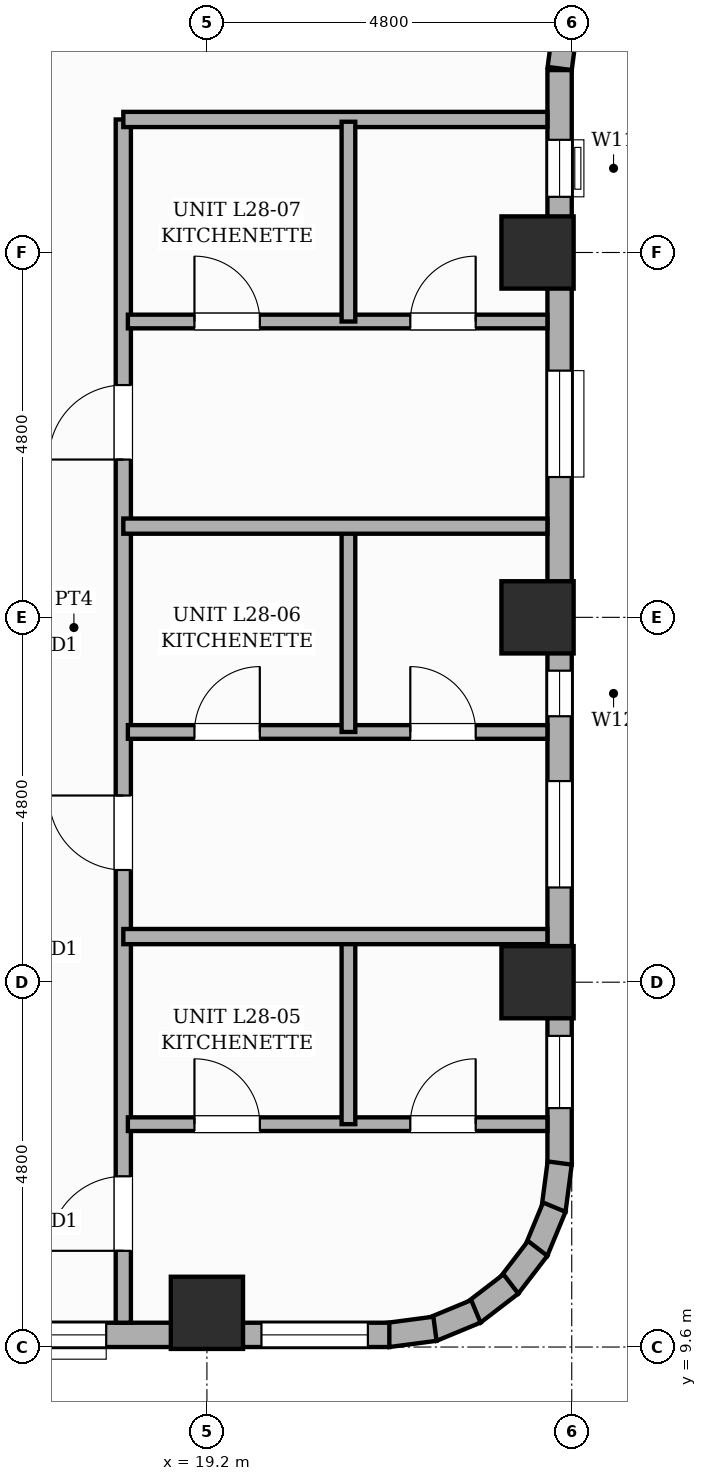
"""IFC4 building model, lengths in metres.
Left out: names, types, materials, properties, quantities, classifications, styles, units other than length and angle.
Written with IfcOpenShell. Run it as: python <this file> out.ifc"""

import sys

from ifc_helpers import new_model, si_unit, direction, frame, frame_2d, origin, origin_2d, place, context, subcontext, project, spatial, rectangle, extrude, element, fill, save


model = new_model("IFC4")
c1 = context("Model", 3, precision=1e-05, world=origin(), true_north=direction((0.0, 1.0)))
c2 = subcontext(c1, "Body", "Model", "MODEL_VIEW")
j1 = project(units=[si_unit("LENGTHUNIT", "METRE"), si_unit("PLANEANGLEUNIT", "RADIAN")], contexts=[c1])
p1 = place(None, origin())
s1 = spatial("IfcSite", under=j1, at=p1, CompositionType="ELEMENT")
p2 = place(p1, origin())
s2 = spatial("IfcBuilding", under=s1, at=p2, CompositionType="ELEMENT")
p3 = place(p2, frame((0.0, 0.0, 110.8)))
s3 = spatial("IfcBuildingStorey", under=s2, at=p3, CompositionType="ELEMENT", Elevation=110.8)
for number, where, z_axis, x_axis in (
    (1, (19.2, 10.05, 0.0), (0.0, 0.0, 1.0), (1.0, 0.0, 0.0)),
    (2, (23.55, 14.4, 0.0), (0.0, 0.0, 1.0), (1.0, 0.0, 0.0)),
    (3, (23.55, 19.2, 0.0), (0.0, 0.0, 1.0), (1.0, 0.0, 0.0)),
    (4, (23.55, 24.0, 0.0), (0.0, 0.0, 1.0), (1.0, 0.0, 0.0)),
):
    element("IfcColumn", number, at=place(p3, frame(where, z_axis=z_axis, x_axis=x_axis)), inside=s3, PredefinedType="COLUMN", context=c2, shape_type="SweptSolid", body=[
        extrude(rectangle(XDim=0.95, YDim=0.95, at=origin_2d()), origin(), (0.0, 0.0, 1.0), 3.6),
    ])
p4 = place(p3, frame((23.923, 27.042, 0.0), z_axis=(0.0, 0.0, 1.0), x_axis=(-0.130555323746, -0.9914410257, 0.0)))
e5 = element("IfcWall", 5, at=p4, inside=s3, PredefinedType="STANDARD", context=c2, shape_type="SweptSolid", body=[
    extrude(rectangle(XDim=0.626, YDim=0.32, at=frame_2d((0.313, 0.0))), origin(), (0.0, 0.0, 1.0), 2.54),
])
p5 = place(p3, frame((23.84, 26.4, 0.0), z_axis=(0.0, 0.0, 1.0), x_axis=(0.0, -1.0, 0.0)))
e6 = element("IfcWall", 6, at=p5, inside=s3, PredefinedType="STANDARD", context=c2, shape_type="SweptSolid", body=[
    extrude(rectangle(XDim=14.4, YDim=0.32, at=frame_2d((7.2, 0.0))), origin(), (0.0, 0.0, 1.0), 2.54),
])
p6 = place(p5, frame((9.354, 0.0, 0.65)))
e7 = element("IfcOpeningElement", 7, at=p6, cuts=e6, PredefinedType="OPENING", context=c2, shape_type="SweptSolid", body=[
    extrude(rectangle(XDim=1.4, YDim=1.1, at=frame_2d((0.7, 0.55))), frame((0.0, 0.17, 0.0), z_axis=(0.0, -1.0, 0.0), x_axis=(1.0, 0.0, 0.0)), (0.0, 0.0, 1.0), 0.34),
])
p7 = place(p5, frame((3.954, 0.0, 0.65)))
e8 = element("IfcOpeningElement", 8, at=p7, cuts=e6, PredefinedType="OPENING", context=c2, shape_type="SweptSolid", body=[
    extrude(rectangle(XDim=1.4, YDim=1.1, at=frame_2d((0.7, 0.55))), frame((0.0, 0.17, 0.0), z_axis=(0.0, -1.0, 0.0), x_axis=(1.0, 0.0, 0.0)), (0.0, 0.0, 1.0), 0.34),
])
p8 = place(p5, frame((12.707, 0.0, 0.45)))
e9 = element("IfcOpeningElement", 9, at=p8, cuts=e6, PredefinedType="OPENING", context=c2, shape_type="SweptSolid", body=[
    extrude(rectangle(XDim=0.95, YDim=1.8, at=frame_2d((0.475, 0.9))), frame((0.0, 0.17, 0.0), z_axis=(0.0, -1.0, 0.0), x_axis=(1.0, 0.0, 0.0)), (0.0, 0.0, 1.0), 0.34),
])
p9 = place(p5, frame((7.902, 0.0, 0.45)))
e10 = element("IfcOpeningElement", 10, at=p9, cuts=e6, PredefinedType="OPENING", context=c2, shape_type="SweptSolid", body=[
    extrude(rectangle(XDim=0.6, YDim=1.8, at=frame_2d((0.3, 0.9))), frame((0.0, 0.17, 0.0), z_axis=(0.0, -1.0, 0.0), x_axis=(1.0, 0.0, 0.0)), (0.0, 0.0, 1.0), 0.34),
])
p10 = place(p5, frame((0.917, 0.0, 0.45)))
e11 = element("IfcOpeningElement", 11, at=p10, cuts=e6, PredefinedType="OPENING", context=c2, shape_type="SweptSolid", body=[
    extrude(rectangle(XDim=0.75, YDim=1.8, at=frame_2d((0.375, 0.9))), frame((0.0, 0.17, 0.0), z_axis=(0.0, -1.0, 0.0), x_axis=(1.0, 0.0, 0.0)), (0.0, 0.0, 1.0), 0.34),
])
p11 = place(p3, frame((23.841, 12.021, 0.0), z_axis=(0.0, 0.0, 1.0), x_axis=(-0.130504898859, -0.991447664465, 0.0)))
e12 = element("IfcWall", 12, at=p11, inside=s3, PredefinedType="STANDARD", context=c2, shape_type="SweptSolid", body=[
    extrude(rectangle(XDim=0.627, YDim=0.32, at=frame_2d((0.313, 0.0))), origin(), (0.0, 0.0, 1.0), 3.36),
])
for number, where, z_axis, x_axis in (
    (13, (23.771, 11.44, 0.0), (0.0, 0.0, 1.0), (-0.383, -0.924, 0.0)),
    (14, (23.552, 10.897, 0.0), (0.0, 0.0, 1.0), (-0.609, -0.793, 0.0)),
    (15, (23.2, 10.43, 0.0), (0.0, 0.0, 1.0), (-0.793, -0.609, 0.0)),
    (16, (22.739, 10.069, 0.0), (0.0, 0.0, 1.0), (-0.924, -0.383, 0.0)),
    (17, (22.2, 9.84, 0.0), (0.0, 0.0, 1.0), (-0.991, -0.131, 0.0)),
):
    element("IfcWall", number, at=place(p3, frame(where, z_axis=z_axis, x_axis=x_axis)), inside=s3, PredefinedType="STANDARD", context=c2, shape_type="SweptSolid", body=[
        extrude(rectangle(XDim=0.626, YDim=0.32, at=frame_2d((0.313, 0.0))), origin(), (0.0, 0.0, 1.0), 3.36),
    ])
p12 = place(p3, frame((21.6, 9.76, 0.0), z_axis=(0.0, 0.0, 1.0), x_axis=(-1.0, 0.0, 0.0)))
e18 = element("IfcWall", 18, at=p12, inside=s3, PredefinedType="STANDARD", context=c2, shape_type="SweptSolid", body=[
    extrude(rectangle(XDim=14.4, YDim=0.32, at=frame_2d((7.2, 0.0))), origin(), (0.0, 0.0, 1.0), 2.54),
])
p13 = place(p12, frame((5.653, 0.0, 0.45)))
e19 = element("IfcOpeningElement", 19, at=p13, cuts=e18, PredefinedType="OPENING", context=c2, shape_type="SweptSolid", body=[
    extrude(rectangle(XDim=0.75, YDim=1.8, at=frame_2d((0.375, 0.9))), frame((0.0, 0.17, 0.0), z_axis=(0.0, -1.0, 0.0), x_axis=(1.0, 0.0, 0.0)), (0.0, 0.0, 1.0), 0.34),
])
p14 = place(p12, frame((0.282, 0.0, 0.65)))
e20 = element("IfcOpeningElement", 20, at=p14, cuts=e18, PredefinedType="OPENING", context=c2, shape_type="SweptSolid", body=[
    extrude(rectangle(XDim=1.4, YDim=1.1, at=frame_2d((0.7, 0.55))), frame((0.0, 0.17, 0.0), z_axis=(0.0, -1.0, 0.0), x_axis=(1.0, 0.0, 0.0)), (0.0, 0.0, 1.0), 0.34),
])
p15 = place(p12, frame((3.725, 0.0, 0.65)))
e21 = element("IfcOpeningElement", 21, at=p15, cuts=e18, PredefinedType="OPENING", context=c2, shape_type="SweptSolid", body=[
    extrude(rectangle(XDim=1.4, YDim=1.1, at=frame_2d((0.7, 0.55))), frame((0.0, 0.17, 0.0), z_axis=(0.0, -1.0, 0.0), x_axis=(1.0, 0.0, 0.0)), (0.0, 0.0, 1.0), 0.34),
])
p16 = place(p3, frame((18.1, 9.92, 0.0), z_axis=(0.0, 0.0, 1.0), x_axis=(0.0, 1.0, 0.0)))
e22 = element("IfcWall", 22, at=p16, inside=s3, PredefinedType="PARTITIONING", context=c2, shape_type="SweptSolid", body=[
    extrude(rectangle(XDim=15.83, YDim=0.2, at=frame_2d((7.915, 0.0))), origin(), (0.0, 0.0, 1.0), 3.36),
])
p17 = place(p16, frame((0.946, 0.0, 0.0)))
e23 = element("IfcOpeningElement", 23, at=p17, cuts=e22, PredefinedType="OPENING", context=c2, shape_type="SweptSolid", body=[
    extrude(rectangle(XDim=0.98, YDim=2.18, at=frame_2d((0.49, 1.09))), frame((0.0, 0.11, 0.0), z_axis=(0.0, -1.0, 0.0), x_axis=(1.0, 0.0, 0.0)), (0.0, 0.0, 1.0), 0.22),
])
p18 = place(p16, frame((5.956, 0.0, 0.0)))
e24 = element("IfcOpeningElement", 24, at=p18, cuts=e22, PredefinedType="OPENING", context=c2, shape_type="SweptSolid", body=[
    extrude(rectangle(XDim=0.98, YDim=2.18, at=frame_2d((0.49, 1.09))), frame((0.0, 0.11, 0.0), z_axis=(0.0, -1.0, 0.0), x_axis=(1.0, 0.0, 0.0)), (0.0, 0.0, 1.0), 0.22),
])
p19 = place(p16, frame((11.356, 0.0, 0.0)))
e25 = element("IfcOpeningElement", 25, at=p19, cuts=e22, PredefinedType="OPENING", context=c2, shape_type="SweptSolid", body=[
    extrude(rectangle(XDim=0.98, YDim=2.18, at=frame_2d((0.49, 1.09))), frame((0.0, 0.11, 0.0), z_axis=(0.0, -1.0, 0.0), x_axis=(1.0, 0.0, 0.0)), (0.0, 0.0, 1.0), 0.22),
])
p20 = place(p3, frame((18.1, 25.75, 0.0), z_axis=(0.0, 0.0, 1.0), x_axis=(1.0, 0.0, 0.0)))
e26 = element("IfcWall", 26, at=p20, inside=s3, PredefinedType="PARTITIONING", context=c2, shape_type="SweptSolid", body=[
    extrude(rectangle(XDim=5.58, YDim=0.2, at=frame_2d((2.79, 0.0))), origin(), (0.0, 0.0, 1.0), 3.36),
])
p21 = place(p3, frame((18.16, 12.532, 0.0), z_axis=(0.0, 0.0, 1.0), x_axis=(1.0, 0.0, 0.0)))
e27 = element("IfcWall", 27, at=p21, inside=s3, PredefinedType="PLUMBINGWALL", context=c2, shape_type="SweptSolid", body=[
    extrude(rectangle(XDim=5.52, YDim=0.18, at=frame_2d((2.76, 0.0))), origin(), (0.0, 0.0, 1.0), 3.36),
])
p22 = place(p21, frame((0.876, 0.0, 0.0)))
e28 = element("IfcOpeningElement", 28, at=p22, cuts=e27, PredefinedType="OPENING", context=c2, shape_type="SweptSolid", body=[
    extrude(rectangle(XDim=0.86, YDim=2.1, at=frame_2d((0.43, 1.05))), frame((0.0, 0.1, 0.0), z_axis=(0.0, -1.0, 0.0), x_axis=(1.0, 0.0, 0.0)), (0.0, 0.0, 1.0), 0.2),
])
p23 = place(p21, frame((3.716, 0.0, 0.0)))
e29 = element("IfcOpeningElement", 29, at=p23, cuts=e27, PredefinedType="OPENING", context=c2, shape_type="SweptSolid", body=[
    extrude(rectangle(XDim=0.86, YDim=2.1, at=frame_2d((0.43, 1.05))), frame((0.0, 0.1, 0.0), z_axis=(0.0, -1.0, 0.0), x_axis=(1.0, 0.0, 0.0)), (0.0, 0.0, 1.0), 0.2),
])
p24 = place(p3, frame((21.062, 12.532, 0.0), z_axis=(0.0, 0.0, 1.0), x_axis=(0.0, 1.0, 0.0)))
e30 = element("IfcWall", 30, at=p24, inside=s3, PredefinedType="PLUMBINGWALL", context=c2, shape_type="SweptSolid", body=[
    extrude(rectangle(XDim=2.508, YDim=0.18, at=frame_2d((1.254, 0.0))), origin(), (0.0, 0.0, 1.0), 3.36),
])
p25 = place(p3, frame((18.1, 15.0, 0.0), z_axis=(0.0, 0.0, 1.0), x_axis=(1.0, 0.0, 0.0)))
e31 = element("IfcWall", 31, at=p25, inside=s3, PredefinedType="SOLIDWALL", context=c2, shape_type="SweptSolid", body=[
    extrude(rectangle(XDim=5.58, YDim=0.2, at=frame_2d((2.79, 0.0))), origin(), (0.0, 0.0, 1.0), 3.36),
])
p26 = place(p3, frame((18.16, 17.692, 0.0), z_axis=(0.0, 0.0, 1.0), x_axis=(1.0, 0.0, 0.0)))
e32 = element("IfcWall", 32, at=p26, inside=s3, PredefinedType="PLUMBINGWALL", context=c2, shape_type="SweptSolid", body=[
    extrude(rectangle(XDim=5.52, YDim=0.18, at=frame_2d((2.76, 0.0))), origin(), (0.0, 0.0, 1.0), 3.36),
])
p27 = place(p26, frame((0.876, 0.0, 0.0)))
e33 = element("IfcOpeningElement", 33, at=p27, cuts=e32, PredefinedType="OPENING", context=c2, shape_type="SweptSolid", body=[
    extrude(rectangle(XDim=0.86, YDim=2.1, at=frame_2d((0.43, 1.05))), frame((0.0, 0.1, 0.0), z_axis=(0.0, -1.0, 0.0), x_axis=(1.0, 0.0, 0.0)), (0.0, 0.0, 1.0), 0.2),
])
p28 = place(p26, frame((3.716, 0.0, 0.0)))
e34 = element("IfcOpeningElement", 34, at=p28, cuts=e32, PredefinedType="OPENING", context=c2, shape_type="SweptSolid", body=[
    extrude(rectangle(XDim=0.86, YDim=2.1, at=frame_2d((0.43, 1.05))), frame((0.0, 0.1, 0.0), z_axis=(0.0, -1.0, 0.0), x_axis=(1.0, 0.0, 0.0)), (0.0, 0.0, 1.0), 0.2),
])
p29 = place(p3, frame((21.062, 17.692, 0.0), z_axis=(0.0, 0.0, 1.0), x_axis=(0.0, 1.0, 0.0)))
e35 = element("IfcWall", 35, at=p29, inside=s3, PredefinedType="PLUMBINGWALL", context=c2, shape_type="SweptSolid", body=[
    extrude(rectangle(XDim=2.748, YDim=0.18, at=frame_2d((1.374, 0.0))), origin(), (0.0, 0.0, 1.0), 3.36),
])
p30 = place(p3, frame((18.1, 20.4, 0.0), z_axis=(0.0, 0.0, 1.0), x_axis=(1.0, 0.0, 0.0)))
e36 = element("IfcWall", 36, at=p30, inside=s3, PredefinedType="SOLIDWALL", context=c2, shape_type="SweptSolid", body=[
    extrude(rectangle(XDim=5.58, YDim=0.2, at=frame_2d((2.79, 0.0))), origin(), (0.0, 0.0, 1.0), 3.36),
])
p31 = place(p3, frame((18.16, 23.092, 0.0), z_axis=(0.0, 0.0, 1.0), x_axis=(1.0, 0.0, 0.0)))
e37 = element("IfcWall", 37, at=p31, inside=s3, PredefinedType="PLUMBINGWALL", context=c2, shape_type="SweptSolid", body=[
    extrude(rectangle(XDim=5.52, YDim=0.18, at=frame_2d((2.76, 0.0))), origin(), (0.0, 0.0, 1.0), 3.36),
])
p32 = place(p31, frame((0.876, 0.0, 0.0)))
e38 = element("IfcOpeningElement", 38, at=p32, cuts=e37, PredefinedType="OPENING", context=c2, shape_type="SweptSolid", body=[
    extrude(rectangle(XDim=0.86, YDim=2.1, at=frame_2d((0.43, 1.05))), frame((0.0, 0.1, 0.0), z_axis=(0.0, -1.0, 0.0), x_axis=(1.0, 0.0, 0.0)), (0.0, 0.0, 1.0), 0.2),
])
p33 = place(p31, frame((3.716, 0.0, 0.0)))
e39 = element("IfcOpeningElement", 39, at=p33, cuts=e37, PredefinedType="OPENING", context=c2, shape_type="SweptSolid", body=[
    extrude(rectangle(XDim=0.86, YDim=2.1, at=frame_2d((0.43, 1.05))), frame((0.0, 0.1, 0.0), z_axis=(0.0, -1.0, 0.0), x_axis=(1.0, 0.0, 0.0)), (0.0, 0.0, 1.0), 0.2),
])
p34 = place(p3, frame((21.062, 23.092, 0.0), z_axis=(0.0, 0.0, 1.0), x_axis=(0.0, 1.0, 0.0)))
e40 = element("IfcWall", 40, at=p34, inside=s3, PredefinedType="PLUMBINGWALL", context=c2, shape_type="SweptSolid", body=[
    extrude(rectangle(XDim=2.628, YDim=0.18, at=frame_2d((1.314, 0.0))), origin(), (0.0, 0.0, 1.0), 3.36),
])
p35 = place(p6, origin())
e41 = element("IfcWindow", 41, at=p35, inside=s3, PartitioningType="SINGLE_PANEL", PredefinedType="WINDOW", context=c2, shape_type="SweptSolid", body=[
    extrude(rectangle(XDim=1.4, YDim=1.1, at=frame_2d((0.7, 0.55))), frame((0.0, 0.03, 0.0), z_axis=(0.0, -1.0, 0.0), x_axis=(1.0, 0.0, 0.0)), (0.0, 0.0, 1.0), 0.06),
])
fill(e7, e41)
p36 = place(p7, origin())
e42 = element("IfcWindow", 42, at=p36, inside=s3, PartitioningType="SINGLE_PANEL", PredefinedType="WINDOW", context=c2, shape_type="SweptSolid", body=[
    extrude(rectangle(XDim=1.4, YDim=1.1, at=frame_2d((0.7, 0.55))), frame((0.0, 0.03, 0.0), z_axis=(0.0, -1.0, 0.0), x_axis=(1.0, 0.0, 0.0)), (0.0, 0.0, 1.0), 0.06),
])
fill(e8, e42)
p37 = place(p8, origin())
e43 = element("IfcWindow", 43, at=p37, inside=s3, PartitioningType="SINGLE_PANEL", PredefinedType="WINDOW", context=c2, shape_type="SweptSolid", body=[
    extrude(rectangle(XDim=0.95, YDim=1.8, at=frame_2d((0.475, 0.9))), frame((0.0, 0.03, 0.0), z_axis=(0.0, -1.0, 0.0), x_axis=(1.0, 0.0, 0.0)), (0.0, 0.0, 1.0), 0.06),
])
fill(e9, e43)
p38 = place(p9, origin())
e44 = element("IfcWindow", 44, at=p38, inside=s3, PartitioningType="SINGLE_PANEL", PredefinedType="WINDOW", context=c2, shape_type="SweptSolid", body=[
    extrude(rectangle(XDim=0.6, YDim=1.8, at=frame_2d((0.3, 0.9))), frame((0.0, 0.03, 0.0), z_axis=(0.0, -1.0, 0.0), x_axis=(1.0, 0.0, 0.0)), (0.0, 0.0, 1.0), 0.06),
])
fill(e10, e44)
p39 = place(p10, origin())
e45 = element("IfcWindow", 45, at=p39, inside=s3, PartitioningType="SINGLE_PANEL", PredefinedType="WINDOW", context=c2, shape_type="SweptSolid", body=[
    extrude(rectangle(XDim=0.75, YDim=1.8, at=frame_2d((0.375, 0.9))), frame((0.0, 0.03, 0.0), z_axis=(0.0, -1.0, 0.0), x_axis=(1.0, 0.0, 0.0)), (0.0, 0.0, 1.0), 0.06),
])
fill(e11, e45)
p40 = place(p14, origin())
e46 = element("IfcWindow", 46, at=p40, inside=s3, PartitioningType="SINGLE_PANEL", PredefinedType="WINDOW", context=c2, shape_type="SweptSolid", body=[
    extrude(rectangle(XDim=1.4, YDim=1.1, at=frame_2d((0.7, 0.55))), frame((0.0, 0.03, 0.0), z_axis=(0.0, -1.0, 0.0), x_axis=(1.0, 0.0, 0.0)), (0.0, 0.0, 1.0), 0.06),
])
fill(e20, e46)
p41 = place(p15, origin())
e47 = element("IfcWindow", 47, at=p41, inside=s3, PartitioningType="SINGLE_PANEL", PredefinedType="WINDOW", context=c2, shape_type="SweptSolid", body=[
    extrude(rectangle(XDim=1.4, YDim=1.1, at=frame_2d((0.7, 0.55))), frame((0.0, 0.03, 0.0), z_axis=(0.0, -1.0, 0.0), x_axis=(1.0, 0.0, 0.0)), (0.0, 0.0, 1.0), 0.06),
])
fill(e21, e47)
p42 = place(p17, origin())
e48 = element("IfcDoor", 48, at=p42, inside=s3, OperationType="SINGLE_SWING_LEFT", PredefinedType="DOOR", context=c2, shape_type="SweptSolid", body=[
    extrude(rectangle(XDim=0.98, YDim=2.18, at=frame_2d((0.49, 1.09))), frame((0.0, 0.025, 0.0), z_axis=(0.0, -1.0, 0.0), x_axis=(1.0, 0.0, 0.0)), (0.0, 0.0, 1.0), 0.05),
])
fill(e23, e48)
p43 = place(p22, origin())
e49 = element("IfcDoor", 49, at=p43, inside=s3, OperationType="SINGLE_SWING_LEFT", PredefinedType="DOOR", context=c2, shape_type="SweptSolid", body=[
    extrude(rectangle(XDim=0.86, YDim=2.1, at=frame_2d((0.43, 1.05))), frame((0.0, 0.025, 0.0), z_axis=(0.0, -1.0, 0.0), x_axis=(1.0, 0.0, 0.0)), (0.0, 0.0, 1.0), 0.05),
])
fill(e28, e49)
p44 = place(p23, origin())
e50 = element("IfcDoor", 50, at=p44, inside=s3, OperationType="SINGLE_SWING_RIGHT", PredefinedType="DOOR", context=c2, shape_type="SweptSolid", body=[
    extrude(rectangle(XDim=0.86, YDim=2.1, at=frame_2d((0.43, 1.05))), frame((0.0, 0.025, 0.0), z_axis=(0.0, -1.0, 0.0), x_axis=(1.0, 0.0, 0.0)), (0.0, 0.0, 1.0), 0.05),
])
fill(e29, e50)
p45 = place(p18, origin())
e51 = element("IfcDoor", 51, at=p45, inside=s3, OperationType="SINGLE_SWING_RIGHT", PredefinedType="DOOR", context=c2, shape_type="SweptSolid", body=[
    extrude(rectangle(XDim=0.98, YDim=2.18, at=frame_2d((0.49, 1.09))), frame((0.0, 0.025, 0.0), z_axis=(0.0, -1.0, 0.0), x_axis=(1.0, 0.0, 0.0)), (0.0, 0.0, 1.0), 0.05),
])
fill(e24, e51)
p46 = place(p27, origin())
e52 = element("IfcDoor", 52, at=p46, inside=s3, OperationType="SINGLE_SWING_RIGHT", PredefinedType="DOOR", context=c2, shape_type="SweptSolid", body=[
    extrude(rectangle(XDim=0.86, YDim=2.1, at=frame_2d((0.43, 1.05))), frame((0.0, 0.025, 0.0), z_axis=(0.0, -1.0, 0.0), x_axis=(1.0, 0.0, 0.0)), (0.0, 0.0, 1.0), 0.05),
])
fill(e33, e52)
p47 = place(p28, origin())
e53 = element("IfcDoor", 53, at=p47, inside=s3, OperationType="SINGLE_SWING_LEFT", PredefinedType="DOOR", context=c2, shape_type="SweptSolid", body=[
    extrude(rectangle(XDim=0.86, YDim=2.1, at=frame_2d((0.43, 1.05))), frame((0.0, 0.025, 0.0), z_axis=(0.0, -1.0, 0.0), x_axis=(1.0, 0.0, 0.0)), (0.0, 0.0, 1.0), 0.05),
])
fill(e34, e53)
p48 = place(p19, origin())
e54 = element("IfcDoor", 54, at=p48, inside=s3, OperationType="SINGLE_SWING_LEFT", PredefinedType="DOOR", context=c2, shape_type="SweptSolid", body=[
    extrude(rectangle(XDim=0.98, YDim=2.18, at=frame_2d((0.49, 1.09))), frame((0.0, 0.025, 0.0), z_axis=(0.0, -1.0, 0.0), x_axis=(1.0, 0.0, 0.0)), (0.0, 0.0, 1.0), 0.05),
])
fill(e25, e54)
p49 = place(p32, origin())
e55 = element("IfcDoor", 55, at=p49, inside=s3, OperationType="SINGLE_SWING_LEFT", PredefinedType="DOOR", context=c2, shape_type="SweptSolid", body=[
    extrude(rectangle(XDim=0.86, YDim=2.1, at=frame_2d((0.43, 1.05))), frame((0.0, 0.025, 0.0), z_axis=(0.0, -1.0, 0.0), x_axis=(1.0, 0.0, 0.0)), (0.0, 0.0, 1.0), 0.05),
])
fill(e38, e55)
p50 = place(p33, origin())
e56 = element("IfcDoor", 56, at=p50, inside=s3, OperationType="SINGLE_SWING_RIGHT", PredefinedType="DOOR", context=c2, shape_type="SweptSolid", body=[
    extrude(rectangle(XDim=0.86, YDim=2.1, at=frame_2d((0.43, 1.05))), frame((0.0, 0.025, 0.0), z_axis=(0.0, -1.0, 0.0), x_axis=(1.0, 0.0, 0.0)), (0.0, 0.0, 1.0), 0.05),
])
fill(e39, e56)
save(model, sys.argv[1])
